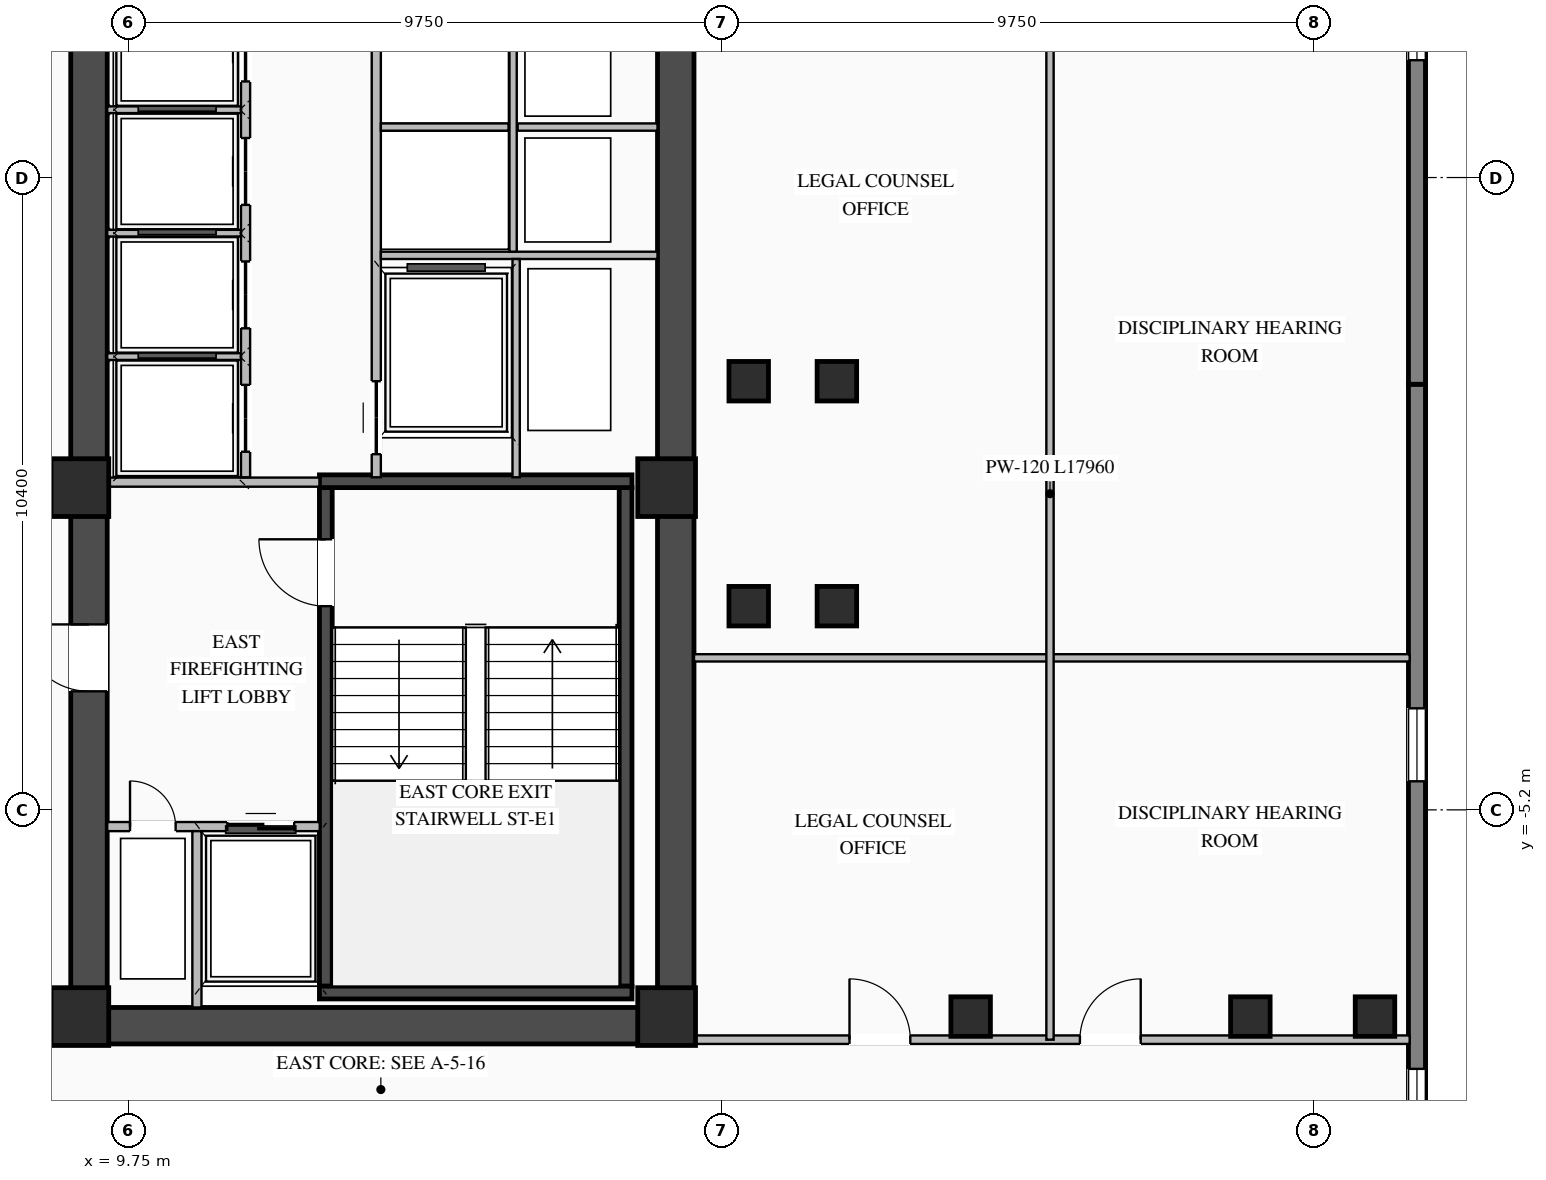
"""IFC4 building model, lengths in metres.
Left out: names, types, materials, properties, quantities, classifications, styles, units other than length and angle.
Written with IfcOpenShell. Run it as: python <this file> out.ifc"""

import sys

from ifc_helpers import new_model, si_unit, direction, frame, frame_2d, origin, origin_2d, place, context, subcontext, project, spatial, rectangle, i_section, extrude, element, fill, save


model = new_model("IFC4")
c1 = context("Model", 3, precision=1e-05, world=origin(), true_north=direction((0.0, 1.0)))
c2 = subcontext(c1, "Body", "Model", "MODEL_VIEW")
j1 = project(units=[si_unit("LENGTHUNIT", "METRE"), si_unit("PLANEANGLEUNIT", "RADIAN")], contexts=[c1])
p1 = place(None, origin())
s1 = spatial("IfcSite", under=j1, at=p1, CompositionType="ELEMENT")
p2 = place(p1, origin())
s2 = spatial("IfcBuilding", under=s1, at=p2, CompositionType="ELEMENT")
p3 = place(p2, frame((0.0, 0.0, 120.85)))
s3 = spatial("IfcBuildingStorey", under=s2, at=p3, CompositionType="ELEMENT", Elevation=120.85)
p4 = place(p3, frame((8.8, -8.75, 0.0), z_axis=(0.0, 0.0, 1.0), x_axis=(1.0, 0.0, 0.0)))
e1 = element("IfcWall", 1, at=p4, inside=s3, PredefinedType="SHEAR", context=c2, shape_type="SweptSolid", body=[
    extrude(rectangle(XDim=10.25, YDim=0.6, at=frame_2d((5.125, 0.0))), origin(), (0.0, 0.0, 1.0), 3.27),
])
p5 = place(p3, frame((9.1, -8.45, 0.0), z_axis=(0.0, 0.0, 1.0), x_axis=(0.0, 1.0, 0.0)))
e2 = element("IfcWall", 2, at=p5, inside=s3, PredefinedType="SHEAR", context=c2, shape_type="SweptSolid", body=[
    extrude(rectangle(XDim=16.9, YDim=0.6, at=frame_2d((8.45, 0.0))), origin(), (0.0, 0.0, 1.0), 3.27),
])
p6 = place(p5, frame((5.2, 0.0, 0.0)))
e3 = element("IfcOpeningElement", 3, at=p6, cuts=e2, PredefinedType="OPENING", context=c2, shape_type="SweptSolid", body=[
    extrude(rectangle(XDim=1.1, YDim=2.08, at=frame_2d((0.55, 1.04))), frame((0.0, 0.31, 0.0), z_axis=(0.0, -1.0, 0.0), x_axis=(1.0, 0.0, 0.0)), (0.0, 0.0, 1.0), 0.62),
])
p7 = place(p3, frame((18.75, -8.45, 0.0), z_axis=(0.0, 0.0, 1.0), x_axis=(0.0, 1.0, 0.0)))
e4 = element("IfcWall", 4, at=p7, inside=s3, PredefinedType="SHEAR", context=c2, shape_type="SweptSolid", body=[
    extrude(rectangle(XDim=16.9, YDim=0.6, at=frame_2d((8.45, 0.0))), origin(), (0.0, 0.0, 1.0), 3.27),
])
p8 = place(p3, frame((12.995, -8.1, 0.0), z_axis=(0.0, 0.0, 1.0), x_axis=(0.0, 1.0, 0.0)))
e5 = element("IfcWall", 5, at=p8, inside=s3, PredefinedType="SHEAR", context=c2, shape_type="SweptSolid", body=[
    extrude(rectangle(XDim=8.2, YDim=0.21, at=frame_2d((4.1, 0.0))), origin(), (0.0, 0.0, 1.0), 3.27),
])
p9 = place(p8, frame((6.25, 0.0, 0.0)))
e6 = element("IfcOpeningElement", 6, at=p9, cuts=e5, PredefinedType="OPENING", context=c2, shape_type="SweptSolid", body=[
    extrude(rectangle(XDim=1.1, YDim=2.15, at=frame_2d((0.55, 1.075))), frame((0.0, 0.115, 0.0), z_axis=(0.0, -1.0, 0.0), x_axis=(1.0, 0.0, 0.0)), (0.0, 0.0, 1.0), 0.23),
])
p10 = place(p3, frame((17.925, -8.1, 0.0), z_axis=(0.0, 0.0, 1.0), x_axis=(0.0, 1.0, 0.0)))
e7 = element("IfcWall", 7, at=p10, inside=s3, PredefinedType="SHEAR", context=c2, shape_type="SweptSolid", body=[
    extrude(rectangle(XDim=8.2, YDim=0.21, at=frame_2d((4.1, 0.0))), origin(), (0.0, 0.0, 1.0), 3.27),
])
for number, where, z_axis, x_axis in (
    (8, (12.89, -8.205, 0.0), (0.0, 0.0, 1.0), (1.0, 0.0, 0.0)),
    (9, (18.03, 0.205, 0.0), (0.0, 0.0, 1.0), (-1.0, 0.0, 0.0)),
):
    element("IfcWall", number, at=place(p3, frame(where, z_axis=z_axis, x_axis=x_axis)), inside=s3, PredefinedType="SHEAR", context=c2, shape_type="SweptSolid", body=[
        extrude(rectangle(XDim=5.14, YDim=0.21, at=frame_2d((2.57, 0.0))), origin(), (0.0, 0.0, 1.0), 3.27),
    ])
for number, where, z_axis, x_axis in (
    (10, (8.95, -8.6, 0.0), (0.0, 0.0, 1.0), (1.0, 0.0, 0.0)),
    (11, (8.95, 0.1, 0.0), (0.0, 0.0, 1.0), (1.0, 0.0, 0.0)),
    (12, (18.6, -8.6, 0.0), (0.0, 0.0, 1.0), (1.0, 0.0, 0.0)),
    (13, (18.6, 0.1, 0.0), (0.0, 0.0, 1.0), (1.0, 0.0, 0.0)),
):
    element("IfcColumn", number, at=place(p3, frame(where, z_axis=z_axis, x_axis=x_axis)), inside=s3, PredefinedType="COLUMN", context=c2, shape_type="SweptSolid", body=[
        extrude(rectangle(XDim=0.95, YDim=0.95, at=origin_2d()), origin(), (0.0, 0.0, 1.0), 3.45),
    ])
for number, where, z_axis, x_axis in (
    (14, (19.95, -1.85, 0.0), (0.0, 0.0, 1.0), (1.0, 0.0, 0.0)),
    (15, (19.95, 1.85, 0.0), (0.0, 0.0, 1.0), (1.0, 0.0, 0.0)),
    (16, (21.4, -1.85, 0.0), (0.0, 0.0, 1.0), (1.0, 0.0, 0.0)),
    (17, (21.4, 1.85, 0.0), (0.0, 0.0, 1.0), (1.0, 0.0, 0.0)),
    (18, (23.6, -8.6, 0.0), (0.0, 0.0, 1.0), (1.0, 0.0, 0.0)),
    (19, (28.2, -8.6, 0.0), (0.0, 0.0, 1.0), (1.0, 0.0, 0.0)),
    (20, (30.25, -8.6, 0.0), (0.0, 0.0, 1.0), (1.0, 0.0, 0.0)),
):
    element("IfcColumn", number, at=place(p3, frame(where, z_axis=z_axis, x_axis=x_axis)), inside=s3, PredefinedType="COLUMN", context=c2, shape_type="SweptSolid", body=[
        extrude(i_section(OverallWidth=0.65, OverallDepth=0.65, WebThickness=0.028, FlangeThickness=0.04, at=origin_2d()), origin(), (0.0, 0.0, 1.0), 3.45),
    ])
p11 = place(p3, frame((30.94, 1.8, 0.0), z_axis=(0.0, 0.0, 1.0), x_axis=(0.0, -1.0, 0.0)))
e21 = element("IfcWall", 21, at=p11, inside=s3, PredefinedType="STANDARD", context=c2, shape_type="SweptSolid", body=[
    extrude(rectangle(XDim=17.79, YDim=0.28, at=frame_2d((8.895, 0.0))), origin(), (0.0, 0.0, 1.0), 3.25),
])
p12 = place(p11, frame((5.33, 0.0, 0.76)))
e22 = element("IfcOpeningElement", 22, at=p12, cuts=e21, PredefinedType="OPENING", context=c2, shape_type="SweptSolid", body=[
    extrude(rectangle(XDim=1.2, YDim=1.95, at=frame_2d((0.6, 0.975))), frame((0.0, 0.15, 0.0), z_axis=(0.0, -1.0, 0.0), x_axis=(1.0, 0.0, 0.0)), (0.0, 0.0, 1.0), 0.3),
])
p13 = place(p11, frame((11.26, 0.0, 0.76)))
e23 = element("IfcOpeningElement", 23, at=p13, cuts=e21, PredefinedType="OPENING", context=c2, shape_type="SweptSolid", body=[
    extrude(rectangle(XDim=1.2, YDim=1.95, at=frame_2d((0.6, 0.975))), frame((0.0, 0.15, 0.0), z_axis=(0.0, -1.0, 0.0), x_axis=(1.0, 0.0, 0.0)), (0.0, 0.0, 1.0), 0.3),
])
p14 = place(p3, frame((30.94, 19.59, 0.0), z_axis=(0.0, 0.0, 1.0), x_axis=(0.0, -1.0, 0.0)))
e24 = element("IfcWall", 24, at=p14, inside=s3, PredefinedType="STANDARD", context=c2, shape_type="SweptSolid", body=[
    extrude(rectangle(XDim=17.79, YDim=0.28, at=frame_2d((8.895, 0.0))), origin(), (0.0, 0.0, 1.0), 3.25),
])
p15 = place(p14, frame((5.33, 0.0, 0.76)))
e25 = element("IfcOpeningElement", 25, at=p15, cuts=e24, PredefinedType="OPENING", context=c2, shape_type="SweptSolid", body=[
    extrude(rectangle(XDim=1.2, YDim=1.95, at=frame_2d((0.6, 0.975))), frame((0.0, 0.15, 0.0), z_axis=(0.0, -1.0, 0.0), x_axis=(1.0, 0.0, 0.0)), (0.0, 0.0, 1.0), 0.3),
])
p16 = place(p14, frame((11.26, 0.0, 0.76)))
e26 = element("IfcOpeningElement", 26, at=p16, cuts=e24, PredefinedType="OPENING", context=c2, shape_type="SweptSolid", body=[
    extrude(rectangle(XDim=1.2, YDim=1.95, at=frame_2d((0.6, 0.975))), frame((0.0, 0.15, 0.0), z_axis=(0.0, -1.0, 0.0), x_axis=(1.0, 0.0, 0.0)), (0.0, 0.0, 1.0), 0.3),
])
p17 = place(p3, frame((9.4, -5.475, 0.0), z_axis=(0.0, 0.0, 1.0), x_axis=(1.0, 0.0, 0.0)))
e27 = element("IfcWall", 27, at=p17, inside=s3, PredefinedType="STANDARD", context=c2, shape_type="SweptSolid", body=[
    extrude(rectangle(XDim=3.495, YDim=0.15, at=frame_2d((1.748, 0.0))), origin(), (0.0, 0.0, 1.0), 3.25),
])
p18 = place(p17, frame((1.975, 0.0, 0.0)))
e28 = element("IfcOpeningElement", 28, at=p18, cuts=e27, PredefinedType="OPENING", context=c2, shape_type="SweptSolid", body=[
    extrude(rectangle(XDim=1.1, YDim=2.15, at=frame_2d((0.55, 1.075))), frame((0.0, 0.085, 0.0), z_axis=(0.0, -1.0, 0.0), x_axis=(1.0, 0.0, 0.0)), (0.0, 0.0, 1.0), 0.17),
])
p19 = place(p17, frame((0.375, 0.0, 0.0)))
e29 = element("IfcOpeningElement", 29, at=p19, cuts=e27, PredefinedType="OPENING", context=c2, shape_type="SweptSolid", body=[
    extrude(rectangle(XDim=0.75, YDim=2.05, at=frame_2d((0.375, 1.025))), frame((0.0, 0.085, 0.0), z_axis=(0.0, -1.0, 0.0), x_axis=(1.0, 0.0, 0.0)), (0.0, 0.0, 1.0), 0.17),
])
p20 = place(p3, frame((10.875, -8.45, 0.0), z_axis=(0.0, 0.0, 1.0), x_axis=(0.0, 1.0, 0.0)))
e30 = element("IfcWall", 30, at=p20, inside=s3, PredefinedType="STANDARD", context=c2, shape_type="SweptSolid", body=[
    extrude(rectangle(XDim=2.9, YDim=0.15, at=frame_2d((1.45, 0.0))), origin(), (0.0, 0.0, 1.0), 3.25),
])
p21 = place(p3, frame((9.4, 0.19, 0.0), z_axis=(0.0, 0.0, 1.0), x_axis=(1.0, 0.0, 0.0)))
e31 = element("IfcWall", 31, at=p21, inside=s3, PredefinedType="STANDARD", context=c2, shape_type="SweptSolid", body=[
    extrude(rectangle(XDim=3.49, YDim=0.15, at=frame_2d((1.745, 0.0))), origin(), (0.0, 0.0, 1.0), 2.645),
])
p22 = place(p3, frame((11.675, 0.27, 0.0), z_axis=(0.0, 0.0, 1.0), x_axis=(0.0, 1.0, 0.0)))
e32 = element("IfcWall", 32, at=p22, inside=s3, PredefinedType="STANDARD", context=c2, shape_type="SweptSolid", body=[
    extrude(rectangle(XDim=8.18, YDim=0.15, at=frame_2d((4.09, 0.0))), origin(), (0.0, 0.0, 1.0), 3.25),
])
p23 = place(p22, frame((0.42, 0.0, 0.0)))
e33 = element("IfcOpeningElement", 33, at=p23, cuts=e32, PredefinedType="OPENING", context=c2, shape_type="SweptSolid", body=[
    extrude(rectangle(XDim=1.1, YDim=2.1, at=frame_2d((0.55, 1.05))), frame((0.0, 0.085, 0.0), z_axis=(0.0, -1.0, 0.0), x_axis=(1.0, 0.0, 0.0)), (0.0, 0.0, 1.0), 0.17),
])
p24 = place(p22, frame((2.45, 0.0, 0.0)))
e34 = element("IfcOpeningElement", 34, at=p24, cuts=e32, PredefinedType="OPENING", context=c2, shape_type="SweptSolid", body=[
    extrude(rectangle(XDim=1.1, YDim=2.1, at=frame_2d((0.55, 1.05))), frame((0.0, 0.085, 0.0), z_axis=(0.0, -1.0, 0.0), x_axis=(1.0, 0.0, 0.0)), (0.0, 0.0, 1.0), 0.17),
])
p25 = place(p22, frame((4.48, 0.0, 0.0)))
e35 = element("IfcOpeningElement", 35, at=p25, cuts=e32, PredefinedType="OPENING", context=c2, shape_type="SweptSolid", body=[
    extrude(rectangle(XDim=1.1, YDim=2.1, at=frame_2d((0.55, 1.05))), frame((0.0, 0.085, 0.0), z_axis=(0.0, -1.0, 0.0), x_axis=(1.0, 0.0, 0.0)), (0.0, 0.0, 1.0), 0.17),
])
p26 = place(p22, frame((6.51, 0.0, 0.0)))
e36 = element("IfcOpeningElement", 36, at=p26, cuts=e32, PredefinedType="OPENING", context=c2, shape_type="SweptSolid", body=[
    extrude(rectangle(XDim=1.1, YDim=2.1, at=frame_2d((0.55, 1.05))), frame((0.0, 0.085, 0.0), z_axis=(0.0, -1.0, 0.0), x_axis=(1.0, 0.0, 0.0)), (0.0, 0.0, 1.0), 0.17),
])
for number, where, z_axis, x_axis in (
    (37, (9.4, 2.255, 0.0), (0.0, 0.0, 1.0), (1.0, 0.0, 0.0)),
    (38, (9.4, 4.285, 0.0), (0.0, 0.0, 1.0), (1.0, 0.0, 0.0)),
    (39, (9.4, 6.315, 0.0), (0.0, 0.0, 1.0), (1.0, 0.0, 0.0)),
):
    element("IfcWall", number, at=place(p3, frame(where, z_axis=z_axis, x_axis=x_axis)), inside=s3, PredefinedType="STANDARD", context=c2, shape_type="SweptSolid", body=[
        extrude(rectangle(XDim=2.2, YDim=0.11, at=frame_2d((1.1, 0.0))), origin(), (0.0, 0.0, 1.0), 3.25),
    ])
p27 = place(p3, frame((13.825, 0.27, 0.0), z_axis=(0.0, 0.0, 1.0), x_axis=(0.0, 1.0, 0.0)))
e40 = element("IfcWall", 40, at=p27, inside=s3, PredefinedType="STANDARD", context=c2, shape_type="SweptSolid", body=[
    extrude(rectangle(XDim=8.18, YDim=0.15, at=frame_2d((4.09, 0.0))), origin(), (0.0, 0.0, 1.0), 3.25),
])
p28 = place(p27, frame((0.38, 0.0, 0.0)))
e41 = element("IfcOpeningElement", 41, at=p28, cuts=e40, PredefinedType="OPENING", context=c2, shape_type="SweptSolid", body=[
    extrude(rectangle(XDim=1.2, YDim=2.1, at=frame_2d((0.6, 1.05))), frame((0.0, 0.085, 0.0), z_axis=(0.0, -1.0, 0.0), x_axis=(1.0, 0.0, 0.0)), (0.0, 0.0, 1.0), 0.17),
])
p29 = place(p3, frame((13.9, 3.92, 0.0), z_axis=(0.0, 0.0, 1.0), x_axis=(1.0, 0.0, 0.0)))
e42 = element("IfcWall", 42, at=p29, inside=s3, PredefinedType="STANDARD", context=c2, shape_type="SweptSolid", body=[
    extrude(rectangle(XDim=4.55, YDim=0.12, at=frame_2d((2.275, 0.0))), origin(), (0.0, 0.0, 1.0), 3.25),
])
p30 = place(p3, frame((16.15, 6.03, 0.0), z_axis=(0.0, 0.0, 1.0), x_axis=(1.0, 0.0, 0.0)))
e43 = element("IfcWall", 43, at=p30, inside=s3, PredefinedType="STANDARD", context=c2, shape_type="SweptSolid", body=[
    extrude(rectangle(XDim=2.3, YDim=0.12, at=frame_2d((1.15, 0.0))), origin(), (0.0, 0.0, 1.0), 3.25),
])
p31 = place(p3, frame((16.075, 3.98, 0.0), z_axis=(0.0, 0.0, 1.0), x_axis=(0.0, 1.0, 0.0)))
e44 = element("IfcWall", 44, at=p31, inside=s3, PredefinedType="STANDARD", context=c2, shape_type="SweptSolid", body=[
    extrude(rectangle(XDim=4.47, YDim=0.12, at=frame_2d((2.235, 0.0))), origin(), (0.0, 0.0, 1.0), 3.25),
])
p32 = place(p3, frame((13.9, 6.03, 0.0), z_axis=(0.0, 0.0, 1.0), x_axis=(1.0, 0.0, 0.0)))
e45 = element("IfcWall", 45, at=p32, inside=s3, PredefinedType="STANDARD", context=c2, shape_type="SweptSolid", body=[
    extrude(rectangle(XDim=2.1, YDim=0.12, at=frame_2d((1.05, 0.0))), origin(), (0.0, 0.0, 1.0), 3.25),
])
p33 = place(p3, frame((16.125, 0.27, 0.0), z_axis=(0.0, 0.0, 1.0), x_axis=(0.0, 1.0, 0.0)))
e46 = element("IfcWall", 46, at=p33, inside=s3, PredefinedType="STANDARD", context=c2, shape_type="SweptSolid", body=[
    extrude(rectangle(XDim=3.59, YDim=0.12, at=frame_2d((1.795, 0.0))), origin(), (0.0, 0.0, 1.0), 3.25),
])
p34 = place(p3, frame((19.05, -8.98, 0.0), z_axis=(0.0, 0.0, 1.0), x_axis=(1.0, 0.0, 0.0)))
e47 = element("IfcWall", 47, at=p34, inside=s3, PredefinedType="STANDARD", context=c2, shape_type="SweptSolid", body=[
    extrude(rectangle(XDim=11.77, YDim=0.14, at=frame_2d((5.885, 0.0))), origin(), (0.0, 0.0, 1.0), 3.25),
])
p35 = place(p34, frame((2.558, 0.0, 0.0)))
e48 = element("IfcOpeningElement", 48, at=p35, cuts=e47, PredefinedType="OPENING", context=c2, shape_type="SweptSolid", body=[
    extrude(rectangle(XDim=1.0, YDim=2.08, at=frame_2d((0.5, 1.04))), frame((0.0, 0.08, 0.0), z_axis=(0.0, -1.0, 0.0), x_axis=(1.0, 0.0, 0.0)), (0.0, 0.0, 1.0), 0.16),
])
p36 = place(p34, frame((6.347, 0.0, 0.0)))
e49 = element("IfcOpeningElement", 49, at=p36, cuts=e47, PredefinedType="OPENING", context=c2, shape_type="SweptSolid", body=[
    extrude(rectangle(XDim=1.0, YDim=2.08, at=frame_2d((0.5, 1.04))), frame((0.0, 0.08, 0.0), z_axis=(0.0, -1.0, 0.0), x_axis=(1.0, 0.0, 0.0)), (0.0, 0.0, 1.0), 0.16),
])
p37 = place(p3, frame((19.05, -2.7, 0.0), z_axis=(0.0, 0.0, 1.0), x_axis=(1.0, 0.0, 0.0)))
e50 = element("IfcWall", 50, at=p37, inside=s3, PredefinedType="STANDARD", context=c2, shape_type="SweptSolid", body=[
    extrude(rectangle(XDim=11.77, YDim=0.12, at=frame_2d((5.885, 0.0))), origin(), (0.0, 0.0, 1.0), 3.25),
])
p38 = place(p3, frame((24.905, -8.98, 0.0), z_axis=(0.0, 0.0, 1.0), x_axis=(0.0, 1.0, 0.0)))
e51 = element("IfcWall", 51, at=p38, inside=s3, PredefinedType="STANDARD", context=c2, shape_type="SweptSolid", body=[
    extrude(rectangle(XDim=17.96, YDim=0.12, at=frame_2d((8.98, 0.0))), origin(), (0.0, 0.0, 1.0), 3.25),
])
p39 = place(p12, origin())
e52 = element("IfcWindow", 52, at=p39, inside=s3, PartitioningType="SINGLE_PANEL", PredefinedType="WINDOW", context=c2, shape_type="SweptSolid", body=[
    extrude(rectangle(XDim=1.2, YDim=1.95, at=frame_2d((0.6, 0.975))), frame((0.0, 0.03, 0.0), z_axis=(0.0, -1.0, 0.0), x_axis=(1.0, 0.0, 0.0)), (0.0, 0.0, 1.0), 0.06),
])
fill(e22, e52)
p40 = place(p13, origin())
e53 = element("IfcWindow", 53, at=p40, inside=s3, PartitioningType="SINGLE_PANEL", PredefinedType="WINDOW", context=c2, shape_type="SweptSolid", body=[
    extrude(rectangle(XDim=1.2, YDim=1.95, at=frame_2d((0.6, 0.975))), frame((0.0, 0.03, 0.0), z_axis=(0.0, -1.0, 0.0), x_axis=(1.0, 0.0, 0.0)), (0.0, 0.0, 1.0), 0.06),
])
fill(e23, e53)
p41 = place(p16, origin())
e54 = element("IfcWindow", 54, at=p41, inside=s3, PartitioningType="SINGLE_PANEL", PredefinedType="WINDOW", context=c2, shape_type="SweptSolid", body=[
    extrude(rectangle(XDim=1.2, YDim=1.95, at=frame_2d((0.6, 0.975))), frame((0.0, 0.03, 0.0), z_axis=(0.0, -1.0, 0.0), x_axis=(1.0, 0.0, 0.0)), (0.0, 0.0, 1.0), 0.06),
])
fill(e26, e54)
p42 = place(p9, origin())
e55 = element("IfcDoor", 55, at=p42, inside=s3, OperationType="SINGLE_SWING_RIGHT", PredefinedType="DOOR", context=c2, shape_type="SweptSolid", body=[
    extrude(rectangle(XDim=1.1, YDim=2.15, at=frame_2d((0.55, 1.075))), frame((0.0, 0.025, 0.0), z_axis=(0.0, -1.0, 0.0), x_axis=(1.0, 0.0, 0.0)), (0.0, 0.0, 1.0), 0.05),
])
fill(e6, e55)
p43 = place(p18, origin())
e56 = element("IfcDoor", 56, at=p43, inside=s3, OperationType="DOUBLE_DOOR_SLIDING", PredefinedType="DOOR", context=c2, shape_type="SweptSolid", body=[
    extrude(rectangle(XDim=1.1, YDim=2.15, at=frame_2d((0.55, 1.075))), frame((0.0, 0.025, 0.0), z_axis=(0.0, -1.0, 0.0), x_axis=(1.0, 0.0, 0.0)), (0.0, 0.0, 1.0), 0.05),
])
fill(e28, e56)
p44 = place(p19, origin())
e57 = element("IfcDoor", 57, at=p44, inside=s3, OperationType="SINGLE_SWING_LEFT", PredefinedType="DOOR", context=c2, shape_type="SweptSolid", body=[
    extrude(rectangle(XDim=0.75, YDim=2.05, at=frame_2d((0.375, 1.025))), frame((0.0, 0.025, 0.0), z_axis=(0.0, -1.0, 0.0), x_axis=(1.0, 0.0, 0.0)), (0.0, 0.0, 1.0), 0.05),
])
fill(e29, e57)
p45 = place(p6, origin())
e58 = element("IfcDoor", 58, at=p45, inside=s3, OperationType="SINGLE_SWING_RIGHT", PredefinedType="DOOR", context=c2, shape_type="SweptSolid", body=[
    extrude(rectangle(XDim=1.1, YDim=2.08, at=frame_2d((0.55, 1.04))), frame((0.0, -0.205, 0.0), z_axis=(0.0, -1.0, 0.0), x_axis=(1.0, 0.0, 0.0)), (0.0, 0.0, 1.0), 0.05),
])
fill(e3, e58)
p46 = place(p23, origin())
e59 = element("IfcDoor", 59, at=p46, inside=s3, OperationType="DOUBLE_DOOR_SLIDING", PredefinedType="DOOR", context=c2, shape_type="SweptSolid", body=[
    extrude(rectangle(XDim=1.1, YDim=2.1, at=frame_2d((0.55, 1.05))), frame((0.0, 0.025, 0.0), z_axis=(0.0, -1.0, 0.0), x_axis=(1.0, 0.0, 0.0)), (0.0, 0.0, 1.0), 0.05),
])
fill(e33, e59)
p47 = place(p24, origin())
e60 = element("IfcDoor", 60, at=p47, inside=s3, OperationType="DOUBLE_DOOR_SLIDING", PredefinedType="DOOR", context=c2, shape_type="SweptSolid", body=[
    extrude(rectangle(XDim=1.1, YDim=2.1, at=frame_2d((0.55, 1.05))), frame((0.0, 0.025, 0.0), z_axis=(0.0, -1.0, 0.0), x_axis=(1.0, 0.0, 0.0)), (0.0, 0.0, 1.0), 0.05),
])
fill(e34, e60)
p48 = place(p25, origin())
e61 = element("IfcDoor", 61, at=p48, inside=s3, OperationType="DOUBLE_DOOR_SLIDING", PredefinedType="DOOR", context=c2, shape_type="SweptSolid", body=[
    extrude(rectangle(XDim=1.1, YDim=2.1, at=frame_2d((0.55, 1.05))), frame((0.0, 0.025, 0.0), z_axis=(0.0, -1.0, 0.0), x_axis=(1.0, 0.0, 0.0)), (0.0, 0.0, 1.0), 0.05),
])
fill(e35, e61)
p49 = place(p26, origin())
e62 = element("IfcDoor", 62, at=p49, inside=s3, OperationType="DOUBLE_DOOR_SLIDING", PredefinedType="DOOR", context=c2, shape_type="SweptSolid", body=[
    extrude(rectangle(XDim=1.1, YDim=2.1, at=frame_2d((0.55, 1.05))), frame((0.0, 0.025, 0.0), z_axis=(0.0, -1.0, 0.0), x_axis=(1.0, 0.0, 0.0)), (0.0, 0.0, 1.0), 0.05),
])
fill(e36, e62)
p50 = place(p28, origin())
e63 = element("IfcDoor", 63, at=p50, inside=s3, OperationType="DOUBLE_DOOR_SLIDING", PredefinedType="DOOR", context=c2, shape_type="SweptSolid", body=[
    extrude(rectangle(XDim=1.2, YDim=2.1, at=frame_2d((0.6, 1.05))), frame((0.0, 0.025, 0.0), z_axis=(0.0, -1.0, 0.0), x_axis=(1.0, 0.0, 0.0)), (0.0, 0.0, 1.0), 0.05),
])
fill(e41, e63)
p51 = place(p35, origin())
e64 = element("IfcDoor", 64, at=p51, inside=s3, OperationType="SINGLE_SWING_LEFT", PredefinedType="DOOR", context=c2, shape_type="SweptSolid", body=[
    extrude(rectangle(XDim=1.0, YDim=2.08, at=frame_2d((0.5, 1.04))), frame((0.0, 0.025, 0.0), z_axis=(0.0, -1.0, 0.0), x_axis=(1.0, 0.0, 0.0)), (0.0, 0.0, 1.0), 0.05),
])
fill(e48, e64)
p52 = place(p36, origin())
e65 = element("IfcDoor", 65, at=p52, inside=s3, OperationType="SINGLE_SWING_RIGHT", PredefinedType="DOOR", context=c2, shape_type="SweptSolid", body=[
    extrude(rectangle(XDim=1.0, YDim=2.08, at=frame_2d((0.5, 1.04))), frame((0.0, 0.025, 0.0), z_axis=(0.0, -1.0, 0.0), x_axis=(1.0, 0.0, 0.0)), (0.0, 0.0, 1.0), 0.05),
])
fill(e49, e65)
save(model, sys.argv[1])
